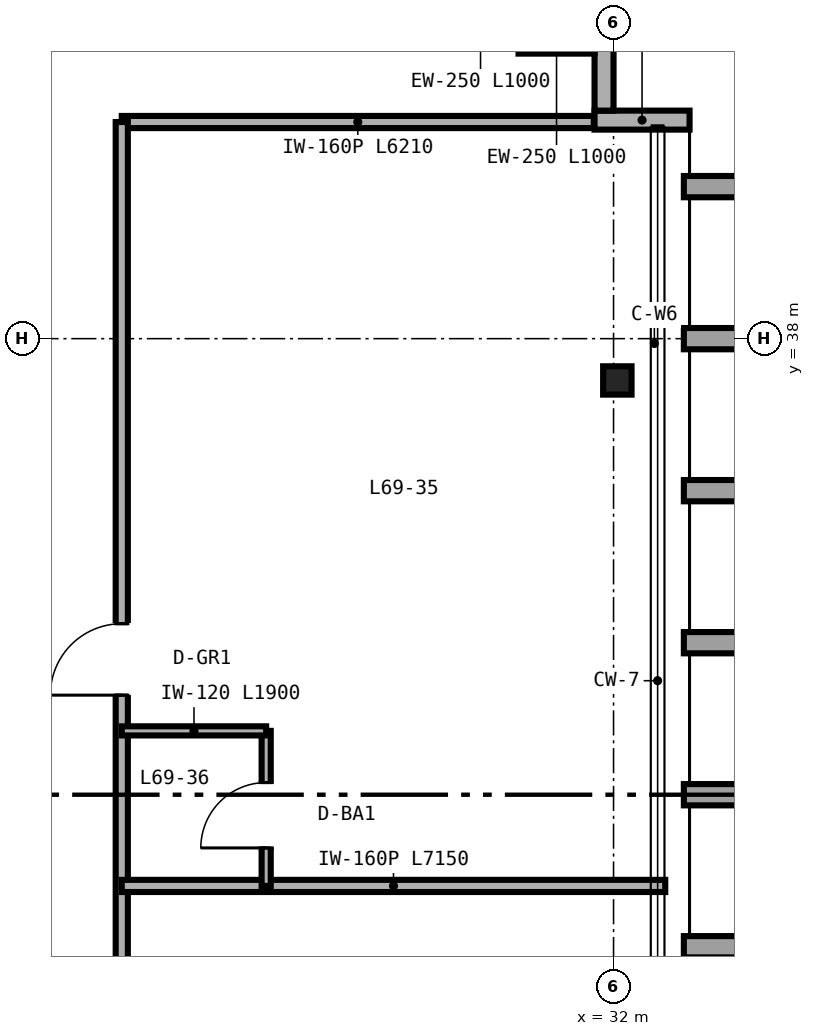
"""IFC4 building model, lengths in metres.
Left out: names, types, materials, properties, quantities, classifications, styles, units other than length and angle.
Written with IfcOpenShell. Run it as: python <this file> out.ifc"""

import sys

from ifc_helpers import new_model, si_unit, direction, frame, frame_2d, origin, origin_2d, place, context, subcontext, project, spatial, rectangle, i_section, extrude, source, transform, mapped, element, fill, save


model = new_model("IFC4")
c1 = context("Model", 3, precision=1e-05, world=origin(), true_north=direction((0.0, 1.0)))
c2 = subcontext(c1, "Body", "Model", "MODEL_VIEW")
j1 = project(units=[si_unit("LENGTHUNIT", "METRE"), si_unit("PLANEANGLEUNIT", "RADIAN")], contexts=[c1])
p1 = place(None, origin())
s1 = spatial("IfcSite", under=j1, at=p1, CompositionType="ELEMENT")
p2 = place(p1, origin())
s2 = spatial("IfcBuilding", under=s1, at=p2, CompositionType="ELEMENT")
p3 = place(p2, frame((0.0, 0.0, 272.4)))
s3 = spatial("IfcBuildingStorey", under=s2, at=p3, CompositionType="ELEMENT", Elevation=272.4)
m1 = source(origin(), c2, "Body", "SweptSolid", [
    extrude(i_section(OverallWidth=0.374, OverallDepth=0.373, WebThickness=0.016, FlangeThickness=0.026, FilletRadius=0.025, at=origin_2d()), origin(), (0.0, 0.0, 1.0), 3.38),
])
p4 = place(p3, frame((32.05, 37.45, 0.0), z_axis=(0.0, 0.0, 1.0), x_axis=(1.0, 0.0, 0.0)))
e1 = element("IfcColumn", 1, at=p4, inside=s3, PredefinedType="COLUMN", context=c2, shape_type="MappedRepresentation", body=[
    mapped(m1, transform((0.0, 0.0, 0.0), scale=1.0)),
])
p5 = place(p3, frame((33.0, 40.875, 0.0), z_axis=(0.0, 0.0, 1.0), x_axis=(-1.0, 0.0, 0.0)))
e2 = element("IfcWall", 2, at=p5, inside=s3, PredefinedType="SOLIDWALL", context=c2, shape_type="SweptSolid", body=[
    extrude(rectangle(XDim=1.25, YDim=0.25, at=frame_2d((0.625, 0.0))), origin(), (0.0, 0.0, 1.0), 3.38),
])
for number, where, z_axis, x_axis in (
    (3, (31.875, 41.0, 0.0), (0.0, 0.0, 1.0), (0.0, 1.0, 0.0)),
    (4, (31.75, 41.875, 0.0), (0.0, 0.0, 1.0), (-1.0, 0.0, 0.0)),
):
    element("IfcWall", number, at=place(p3, frame(where, z_axis=z_axis, x_axis=x_axis)), inside=s3, PredefinedType="SOLIDWALL", context=c2, shape_type="SweptSolid", body=[
        extrude(rectangle(XDim=1.0, YDim=0.25, at=frame_2d((0.5, 0.0))), origin(), (0.0, 0.0, 1.0), 3.38),
    ])
p6 = place(p3, frame((25.53, 40.85, 0.0), z_axis=(0.0, 0.0, 1.0), x_axis=(1.0, 0.0, 0.0)))
e5 = element("IfcWall", 5, at=p6, inside=s3, PredefinedType="PARTITIONING", context=c2, shape_type="SweptSolid", body=[
    extrude(rectangle(XDim=6.21, YDim=0.16, at=frame_2d((3.105, 0.0))), origin(), (0.0, 0.0, 1.0), 3.38),
])
p7 = place(p3, frame((25.53, 11.15, 0.0), z_axis=(0.0, 0.0, 1.0), x_axis=(0.0, 1.0, 0.0)))
e6 = element("IfcWall", 6, at=p7, inside=s3, PredefinedType="PARTITIONING", context=c2, shape_type="SweptSolid", body=[
    extrude(rectangle(XDim=29.7, YDim=0.16, at=frame_2d((14.85, 0.0))), origin(), (0.0, 0.0, 1.0), 2.524),
])
p8 = place(p7, frame((2.51, 0.0, 0.0)))
e7 = element("IfcOpeningElement", 7, at=p8, cuts=e6, PredefinedType="OPENING", context=c2, shape_type="SweptSolid", body=[
    extrude(rectangle(XDim=0.94, YDim=2.15, at=frame_2d((0.47, 1.075))), frame((0.0, 0.09, 0.0), z_axis=(0.0, -1.0, 0.0), x_axis=(1.0, 0.0, 0.0)), (0.0, 0.0, 1.0), 0.18),
])
p9 = place(p7, frame((12.56, 0.0, 0.0)))
e8 = element("IfcOpeningElement", 8, at=p9, cuts=e6, PredefinedType="OPENING", context=c2, shape_type="SweptSolid", body=[
    extrude(rectangle(XDim=0.94, YDim=2.15, at=frame_2d((0.47, 1.075))), frame((0.0, 0.09, 0.0), z_axis=(0.0, -1.0, 0.0), x_axis=(1.0, 0.0, 0.0)), (0.0, 0.0, 1.0), 0.18),
])
p10 = place(p7, frame((22.16, 0.0, 0.0)))
e9 = element("IfcOpeningElement", 9, at=p10, cuts=e6, PredefinedType="OPENING", context=c2, shape_type="SweptSolid", body=[
    extrude(rectangle(XDim=0.94, YDim=2.15, at=frame_2d((0.47, 1.075))), frame((0.0, 0.09, 0.0), z_axis=(0.0, -1.0, 0.0), x_axis=(1.0, 0.0, 0.0)), (0.0, 0.0, 1.0), 0.18),
])
p11 = place(p3, frame((25.53, 30.8, 0.0), z_axis=(0.0, 0.0, 1.0), x_axis=(1.0, 0.0, 0.0)))
e10 = element("IfcWall", 10, at=p11, inside=s3, PredefinedType="PARTITIONING", context=c2, shape_type="SweptSolid", body=[
    extrude(rectangle(XDim=7.15, YDim=0.16, at=frame_2d((3.575, 0.0))), origin(), (0.0, 0.0, 1.0), 2.763),
])
p12 = place(p3, frame((27.43, 30.8, 0.0), z_axis=(0.0, 0.0, 1.0), x_axis=(0.0, 1.0, 0.0)))
e11 = element("IfcWall", 11, at=p12, inside=s3, PredefinedType="PARTITIONING", context=c2, shape_type="SweptSolid", body=[
    extrude(rectangle(XDim=2.04, YDim=0.12, at=frame_2d((1.02, 0.0))), origin(), (0.0, 0.0, 1.0), 3.38),
])
p13 = place(p12, frame((0.5, 0.0, 0.0)))
e12 = element("IfcOpeningElement", 12, at=p13, cuts=e11, PredefinedType="OPENING", context=c2, shape_type="SweptSolid", body=[
    extrude(rectangle(XDim=0.86, YDim=2.1, at=frame_2d((0.43, 1.05))), frame((0.0, 0.07, 0.0), z_axis=(0.0, -1.0, 0.0), x_axis=(1.0, 0.0, 0.0)), (0.0, 0.0, 1.0), 0.14),
])
p14 = place(p3, frame((25.53, 32.84, 0.0), z_axis=(0.0, 0.0, 1.0), x_axis=(1.0, 0.0, 0.0)))
e13 = element("IfcWall", 13, at=p14, inside=s3, PredefinedType="PARTITIONING", context=c2, shape_type="SweptSolid", body=[
    extrude(rectangle(XDim=1.9, YDim=0.12, at=frame_2d((0.95, 0.0))), origin(), (0.0, 0.0, 1.0), 3.38),
])
m2 = source(origin(), c2, "Body", "SweptSolid", [
    extrude(rectangle(XDim=0.86, YDim=2.1, at=frame_2d((0.43, 1.05))), frame((0.0, 0.025, 0.0), z_axis=(0.0, -1.0, 0.0), x_axis=(1.0, 0.0, 0.0)), (0.0, 0.0, 1.0), 0.05),
])
p15 = place(p13, origin())
e14 = element("IfcDoor", 14, at=p15, inside=s3, OperationType="SINGLE_SWING_LEFT", PredefinedType="DOOR", context=c2, shape_type="MappedRepresentation", body=[
    mapped(m2, transform((0.0, 0.0, 0.0), scale=1.0)),
])
fill(e12, e14)
m3 = source(origin(), c2, "Body", "SweptSolid", [
    extrude(rectangle(XDim=0.94, YDim=2.15, at=frame_2d((0.47, 1.075))), frame((0.0, 0.025, 0.0), z_axis=(0.0, -1.0, 0.0), x_axis=(1.0, 0.0, 0.0)), (0.0, 0.0, 1.0), 0.05),
])
p16 = place(p10, origin())
e15 = element("IfcDoor", 15, at=p16, inside=s3, OperationType="SINGLE_SWING_LEFT", PredefinedType="DOOR", context=c2, shape_type="MappedRepresentation", body=[
    mapped(m3, transform((0.0, 0.0, 0.0), scale=1.0)),
])
fill(e9, e15)
save(model, sys.argv[1])
